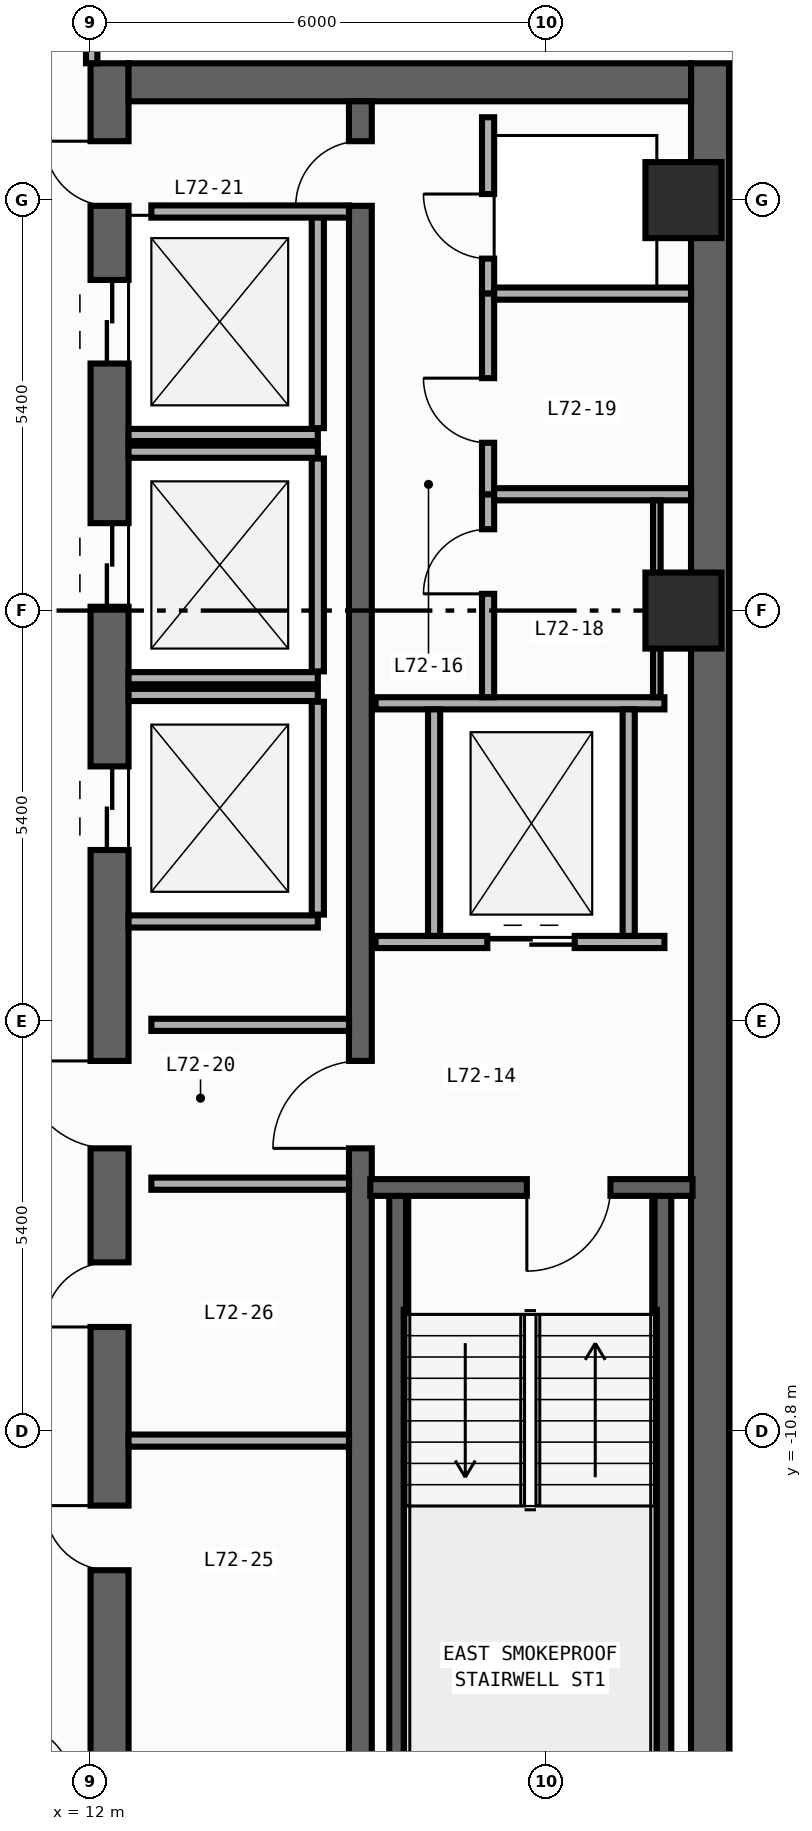
"""IFC4 building model, lengths in metres.
Left out: names, types, materials, properties, quantities, classifications, styles, units other than length and angle.
Written with IfcOpenShell. Run it as: python <this file> out.ifc"""

import sys

from ifc_helpers import new_model, si_unit, direction, frame, frame_2d, origin, origin_2d, place, context, subcontext, project, spatial, rectangle, circle, extrude, element, fill, save


model = new_model("IFC4")
c1 = context("Model", 3, precision=1e-05, world=origin(), true_north=direction((0.0, 1.0)))
c2 = subcontext(c1, "Body", "Model", "MODEL_VIEW")
j1 = project(units=[si_unit("LENGTHUNIT", "METRE"), si_unit("PLANEANGLEUNIT", "RADIAN")], contexts=[c1])
p1 = place(None, origin())
s1 = spatial("IfcSite", under=j1, at=p1, CompositionType="ELEMENT")
p2 = place(p1, origin())
s2 = spatial("IfcBuilding", under=s1, at=p2, CompositionType="ELEMENT")
p3 = place(p2, frame((0.0, 0.0, 300.4)))
s3 = spatial("IfcBuildingStorey", under=s2, at=p3, CompositionType="ELEMENT", Elevation=300.4)
p4 = place(p3, frame((12.25, -19.8, 0.0), z_axis=(0.0, 0.0, 1.0), x_axis=(0.0, 1.0, 0.0)))
e1 = element("IfcWall", 1, at=p4, inside=s3, PredefinedType="SHEAR", context=c2, shape_type="SweptSolid", body=[
    extrude(rectangle(XDim=27.0, YDim=0.5, at=frame_2d((13.5, 0.0))), origin(), (0.0, 0.0, 1.0), 3.54),
])
p5 = place(p4, frame((23.05, 0.0, 0.0)))
e2 = element("IfcOpeningElement", 2, at=p5, cuts=e1, PredefinedType="OPENING", context=c2, shape_type="SweptSolid", body=[
    extrude(rectangle(XDim=1.1, YDim=2.2, at=frame_2d((0.55, 1.1))), frame((0.0, 0.26, 0.0), z_axis=(0.0, -1.0, 0.0), x_axis=(1.0, 0.0, 0.0)), (0.0, 0.0, 1.0), 0.52),
])
p6 = place(p4, frame((19.85, 0.0, 0.0)))
e3 = element("IfcOpeningElement", 3, at=p6, cuts=e1, PredefinedType="OPENING", context=c2, shape_type="SweptSolid", body=[
    extrude(rectangle(XDim=1.1, YDim=2.2, at=frame_2d((0.55, 1.1))), frame((0.0, 0.26, 0.0), z_axis=(0.0, -1.0, 0.0), x_axis=(1.0, 0.0, 0.0)), (0.0, 0.0, 1.0), 0.52),
])
p7 = place(p4, frame((16.65, 0.0, 0.0)))
e4 = element("IfcOpeningElement", 4, at=p7, cuts=e1, PredefinedType="OPENING", context=c2, shape_type="SweptSolid", body=[
    extrude(rectangle(XDim=1.1, YDim=2.2, at=frame_2d((0.55, 1.1))), frame((0.0, 0.26, 0.0), z_axis=(0.0, -1.0, 0.0), x_axis=(1.0, 0.0, 0.0)), (0.0, 0.0, 1.0), 0.52),
])
p8 = place(p4, frame((7.175, 0.0, 0.0)))
e5 = element("IfcOpeningElement", 5, at=p8, cuts=e1, PredefinedType="OPENING", context=c2, shape_type="SweptSolid", body=[
    extrude(rectangle(XDim=0.85, YDim=2.1, at=frame_2d((0.425, 1.05))), frame((0.0, 0.26, 0.0), z_axis=(0.0, -1.0, 0.0), x_axis=(1.0, 0.0, 0.0)), (0.0, 0.0, 1.0), 0.52),
])
p9 = place(p4, frame((10.375, 0.0, 0.0)))
e6 = element("IfcOpeningElement", 6, at=p9, cuts=e1, PredefinedType="OPENING", context=c2, shape_type="SweptSolid", body=[
    extrude(rectangle(XDim=0.85, YDim=2.1, at=frame_2d((0.425, 1.05))), frame((0.0, 0.26, 0.0), z_axis=(0.0, -1.0, 0.0), x_axis=(1.0, 0.0, 0.0)), (0.0, 0.0, 1.0), 0.52),
])
p10 = place(p4, frame((12.725, 0.0, 0.0)))
e7 = element("IfcOpeningElement", 7, at=p10, cuts=e1, PredefinedType="OPENING", context=c2, shape_type="SweptSolid", body=[
    extrude(rectangle(XDim=1.15, YDim=2.2, at=frame_2d((0.575, 1.1))), frame((0.0, 0.26, 0.0), z_axis=(0.0, -1.0, 0.0), x_axis=(1.0, 0.0, 0.0)), (0.0, 0.0, 1.0), 0.52),
])
p11 = place(p4, frame((25.125, 0.0, 0.0)))
e8 = element("IfcOpeningElement", 8, at=p11, cuts=e1, PredefinedType="OPENING", context=c2, shape_type="SweptSolid", body=[
    extrude(rectangle(XDim=0.85, YDim=2.1, at=frame_2d((0.425, 1.05))), frame((0.0, 0.26, 0.0), z_axis=(0.0, -1.0, 0.0), x_axis=(1.0, 0.0, 0.0)), (0.0, 0.0, 1.0), 0.52),
])
p12 = place(p3, frame((20.15, -19.8, 0.0), z_axis=(0.0, 0.0, 1.0), x_axis=(0.0, 1.0, 0.0)))
e9 = element("IfcWall", 9, at=p12, inside=s3, PredefinedType="SHEAR", context=c2, shape_type="SweptSolid", body=[
    extrude(rectangle(XDim=27.0, YDim=0.5, at=frame_2d((13.5, 0.0))), origin(), (0.0, 0.0, 1.0), 3.54),
])
p13 = place(p3, frame((12.5, 6.95, 0.0), z_axis=(0.0, 0.0, 1.0), x_axis=(1.0, 0.0, 0.0)))
e10 = element("IfcWall", 10, at=p13, inside=s3, PredefinedType="SHEAR", context=c2, shape_type="SweptSolid", body=[
    extrude(rectangle(XDim=7.4, YDim=0.5, at=frame_2d((3.7, 0.0))), origin(), (0.0, 0.0, 1.0), 3.54),
])
p14 = place(p3, frame((15.55, -19.3, 0.0), z_axis=(0.0, 0.0, 1.0), x_axis=(0.0, 1.0, 0.0)))
e11 = element("IfcWall", 11, at=p14, inside=s3, PredefinedType="SHEAR", context=c2, shape_type="SweptSolid", body=[
    extrude(rectangle(XDim=26.0, YDim=0.3, at=frame_2d((13.0, 0.0))), origin(), (0.0, 0.0, 1.0), 3.54),
])
p15 = place(p14, frame((12.225, 0.0, 0.0)))
e12 = element("IfcOpeningElement", 12, at=p15, cuts=e11, PredefinedType="OPENING", context=c2, shape_type="SweptSolid", body=[
    extrude(rectangle(XDim=1.15, YDim=2.2, at=frame_2d((0.575, 1.1))), frame((0.0, 0.16, 0.0), z_axis=(0.0, -1.0, 0.0), x_axis=(1.0, 0.0, 0.0)), (0.0, 0.0, 1.0), 0.32),
])
p16 = place(p14, frame((24.625, 0.0, 0.0)))
e13 = element("IfcOpeningElement", 13, at=p16, cuts=e11, PredefinedType="OPENING", context=c2, shape_type="SweptSolid", body=[
    extrude(rectangle(XDim=0.85, YDim=2.1, at=frame_2d((0.425, 1.05))), frame((0.0, 0.16, 0.0), z_axis=(0.0, -1.0, 0.0), x_axis=(1.0, 0.0, 0.0)), (0.0, 0.0, 1.0), 0.32),
])
for number, where, z_axis, x_axis in (
    (14, (16.04, -19.01, 0.0), (0.0, 0.0, 1.0), (0.0, 1.0, 0.0)),
    (15, (19.53, -19.01, 0.0), (0.0, 0.0, 1.0), (0.0, 1.0, 0.0)),
):
    element("IfcWall", number, at=place(p3, frame(where, z_axis=z_axis, x_axis=x_axis)), inside=s3, PredefinedType="SHEAR", context=c2, shape_type="SweptSolid", body=[
        extrude(rectangle(XDim=11.42, YDim=0.22, at=frame_2d((5.71, 0.0))), origin(), (0.0, 0.0, 1.0), 3.54),
    ])
p17 = place(p3, frame((19.92, -7.59, 0.0), z_axis=(0.0, 0.0, 1.0), x_axis=(-1.0, 0.0, 0.0)))
e16 = element("IfcWall", 16, at=p17, inside=s3, PredefinedType="SHEAR", context=c2, shape_type="SweptSolid", body=[
    extrude(rectangle(XDim=4.24, YDim=0.22, at=frame_2d((2.12, 0.0))), origin(), (0.0, 0.0, 1.0), 3.54),
])
p18 = place(p17, frame((1.08, 0.0, 0.0)))
e17 = element("IfcOpeningElement", 17, at=p18, cuts=e16, PredefinedType="OPENING", context=c2, shape_type="SweptSolid", body=[
    extrude(rectangle(XDim=1.1, YDim=2.2, at=frame_2d((0.55, 1.1))), frame((0.0, 0.12, 0.0), z_axis=(0.0, -1.0, 0.0), x_axis=(1.0, 0.0, 0.0)), (0.0, 0.0, 1.0), 0.24),
])
for number, where, z_axis, x_axis in (
    (18, (19.8, 0.0, 0.0), (0.0, 0.0, 1.0), (1.0, 0.0, 0.0)),
    (19, (19.8, 5.4, 0.0), (0.0, 0.0, 1.0), (1.0, 0.0, 0.0)),
):
    element("IfcColumn", number, at=place(p3, frame(where, z_axis=z_axis, x_axis=x_axis)), inside=s3, PredefinedType="COLUMN", context=c2, shape_type="SweptSolid", body=[
        extrude(circle(Radius=0.5, at=origin_2d()), origin(), (0.0, 0.0, 1.0), 3.8),
    ])
p19 = place(p3, frame((12.5, 2.31, 0.0), z_axis=(0.0, 0.0, 1.0), x_axis=(1.0, 0.0, 0.0)))
e20 = element("IfcWall", 20, at=p19, inside=s3, PredefinedType="STANDARD", context=c2, shape_type="SweptSolid", body=[
    extrude(rectangle(XDim=2.49, YDim=0.16, at=frame_2d((1.245, 0.0))), origin(), (0.0, 0.0, 1.0), 3.54),
])
p20 = place(p3, frame((14.99, 2.4, 0.0), z_axis=(0.0, 0.0, 1.0), x_axis=(0.0, 1.0, 0.0)))
e21 = element("IfcWall", 21, at=p20, inside=s3, PredefinedType="STANDARD", context=c2, shape_type="SweptSolid", body=[
    extrude(rectangle(XDim=2.8, YDim=0.16, at=frame_2d((1.4, 0.0))), origin(), (0.0, 0.0, 1.0), 3.54),
])
for number, where, z_axis, x_axis in (
    (22, (12.5, -0.89, 0.0), (0.0, 0.0, 1.0), (1.0, 0.0, 0.0)),
    (23, (12.5, 2.09, 0.0), (0.0, 0.0, 1.0), (1.0, 0.0, 0.0)),
):
    element("IfcWall", number, at=place(p3, frame(where, z_axis=z_axis, x_axis=x_axis)), inside=s3, PredefinedType="STANDARD", context=c2, shape_type="SweptSolid", body=[
        extrude(rectangle(XDim=2.49, YDim=0.16, at=frame_2d((1.245, 0.0))), origin(), (0.0, 0.0, 1.0), 3.54),
    ])
p21 = place(p3, frame((14.99, -0.8, 0.0), z_axis=(0.0, 0.0, 1.0), x_axis=(0.0, 1.0, 0.0)))
e24 = element("IfcWall", 24, at=p21, inside=s3, PredefinedType="STANDARD", context=c2, shape_type="SweptSolid", body=[
    extrude(rectangle(XDim=2.8, YDim=0.16, at=frame_2d((1.4, 0.0))), origin(), (0.0, 0.0, 1.0), 3.54),
])
for number, where, z_axis, x_axis in (
    (25, (12.5, -4.09, 0.0), (0.0, 0.0, 1.0), (1.0, 0.0, 0.0)),
    (26, (12.5, -1.11, 0.0), (0.0, 0.0, 1.0), (1.0, 0.0, 0.0)),
):
    element("IfcWall", number, at=place(p3, frame(where, z_axis=z_axis, x_axis=x_axis)), inside=s3, PredefinedType="STANDARD", context=c2, shape_type="SweptSolid", body=[
        extrude(rectangle(XDim=2.49, YDim=0.16, at=frame_2d((1.245, 0.0))), origin(), (0.0, 0.0, 1.0), 3.54),
    ])
p22 = place(p3, frame((14.99, -4.0, 0.0), z_axis=(0.0, 0.0, 1.0), x_axis=(0.0, 1.0, 0.0)))
e27 = element("IfcWall", 27, at=p22, inside=s3, PredefinedType="STANDARD", context=c2, shape_type="SweptSolid", body=[
    extrude(rectangle(XDim=2.8, YDim=0.16, at=frame_2d((1.4, 0.0))), origin(), (0.0, 0.0, 1.0), 3.54),
])
p23 = place(p3, frame((15.75, -4.36, 0.0), z_axis=(0.0, 0.0, 1.0), x_axis=(1.0, 0.0, 0.0)))
e28 = element("IfcWall", 28, at=p23, inside=s3, PredefinedType="STANDARD", context=c2, shape_type="SweptSolid", body=[
    extrude(rectangle(XDim=3.8, YDim=0.16, at=frame_2d((1.9, 0.0))), origin(), (0.0, 0.0, 1.0), 3.54),
])
p24 = place(p23, frame((1.47, 0.0, 0.0)))
e29 = element("IfcOpeningElement", 29, at=p24, cuts=e28, PredefinedType="OPENING", context=c2, shape_type="SweptSolid", body=[
    extrude(rectangle(XDim=1.15, YDim=2.2, at=frame_2d((0.575, 1.1))), frame((0.0, 0.09, 0.0), z_axis=(0.0, -1.0, 0.0), x_axis=(1.0, 0.0, 0.0)), (0.0, 0.0, 1.0), 0.18),
])
p25 = place(p3, frame((15.75, -1.22, 0.0), z_axis=(0.0, 0.0, 1.0), x_axis=(1.0, 0.0, 0.0)))
e30 = element("IfcWall", 30, at=p25, inside=s3, PredefinedType="STANDARD", context=c2, shape_type="SweptSolid", body=[
    extrude(rectangle(XDim=3.8, YDim=0.16, at=frame_2d((1.9, 0.0))), origin(), (0.0, 0.0, 1.0), 3.54),
])
for number, where, z_axis, x_axis in (
    (31, (16.52, -4.28, 0.0), (0.0, 0.0, 1.0), (0.0, 1.0, 0.0)),
    (32, (19.08, -4.28, 0.0), (0.0, 0.0, 1.0), (0.0, 1.0, 0.0)),
):
    element("IfcWall", number, at=place(p3, frame(where, z_axis=z_axis, x_axis=x_axis)), inside=s3, PredefinedType="STANDARD", context=c2, shape_type="SweptSolid", body=[
        extrude(rectangle(XDim=2.98, YDim=0.16, at=frame_2d((1.49, 0.0))), origin(), (0.0, 0.0, 1.0), 3.54),
    ])
for number, where, z_axis, x_axis in (
    (33, (12.8, -5.45, 0.0), (0.0, 0.0, 1.0), (1.0, 0.0, 0.0)),
    (34, (12.8, -7.54, 0.0), (0.0, 0.0, 1.0), (1.0, 0.0, 0.0)),
    (35, (12.8, 5.25, 0.0), (0.0, 0.0, 1.0), (1.0, 0.0, 0.0)),
):
    element("IfcWall", number, at=place(p3, frame(where, z_axis=z_axis, x_axis=x_axis)), inside=s3, PredefinedType="STANDARD", context=c2, shape_type="SweptSolid", body=[
        extrude(rectangle(XDim=2.6, YDim=0.16, at=frame_2d((1.3, 0.0))), origin(), (0.0, 0.0, 1.0), 3.54),
    ])
p26 = place(p3, frame((17.23, 4.17, 0.0), z_axis=(0.0, 0.0, 1.0), x_axis=(0.0, 1.0, 0.0)))
e36 = element("IfcWall", 36, at=p26, inside=s3, PredefinedType="PARTITIONING", context=c2, shape_type="SweptSolid", body=[
    extrude(rectangle(XDim=2.32, YDim=0.16, at=frame_2d((1.16, 0.0))), origin(), (0.0, 0.0, 1.0), 3.54),
])
p27 = place(p26, frame((0.46, 0.0, 0.0)))
e37 = element("IfcOpeningElement", 37, at=p27, cuts=e36, PredefinedType="OPENING", context=c2, shape_type="SweptSolid", body=[
    extrude(rectangle(XDim=0.85, YDim=2.1, at=frame_2d((0.425, 1.05))), frame((0.0, 0.09, 0.0), z_axis=(0.0, -1.0, 0.0), x_axis=(1.0, 0.0, 0.0)), (0.0, 0.0, 1.0), 0.18),
])
p28 = place(p3, frame((17.23, -1.14, 0.0), z_axis=(0.0, 0.0, 1.0), x_axis=(0.0, 1.0, 0.0)))
e38 = element("IfcWall", 38, at=p28, inside=s3, PredefinedType="PARTITIONING", context=c2, shape_type="SweptSolid", body=[
    extrude(rectangle(XDim=2.67, YDim=0.16, at=frame_2d((1.335, 0.0))), origin(), (0.0, 0.0, 1.0), 3.54),
])
p29 = place(p28, frame((1.36, 0.0, 0.0)))
e39 = element("IfcOpeningElement", 39, at=p29, cuts=e38, PredefinedType="OPENING", context=c2, shape_type="SweptSolid", body=[
    extrude(rectangle(XDim=0.85, YDim=2.1, at=frame_2d((0.425, 1.05))), frame((0.0, 0.09, 0.0), z_axis=(0.0, -1.0, 0.0), x_axis=(1.0, 0.0, 0.0)), (0.0, 0.0, 1.0), 0.18),
])
p30 = place(p3, frame((17.23, 1.53, 0.0), z_axis=(0.0, 0.0, 1.0), x_axis=(0.0, 1.0, 0.0)))
e40 = element("IfcWall", 40, at=p30, inside=s3, PredefinedType="PARTITIONING", context=c2, shape_type="SweptSolid", body=[
    extrude(rectangle(XDim=2.64, YDim=0.16, at=frame_2d((1.32, 0.0))), origin(), (0.0, 0.0, 1.0), 3.54),
])
p31 = place(p30, frame((0.677, 0.0, 0.0)))
e41 = element("IfcOpeningElement", 41, at=p31, cuts=e40, PredefinedType="OPENING", context=c2, shape_type="SweptSolid", body=[
    extrude(rectangle(XDim=0.85, YDim=2.1, at=frame_2d((0.425, 1.05))), frame((0.0, 0.09, 0.0), z_axis=(0.0, -1.0, 0.0), x_axis=(1.0, 0.0, 0.0)), (0.0, 0.0, 1.0), 0.18),
])
for number, where, z_axis, x_axis in (
    (42, (17.31, 4.17, 0.0), (0.0, 0.0, 1.0), (1.0, 0.0, 0.0)),
    (43, (17.31, 1.53, 0.0), (0.0, 0.0, 1.0), (1.0, 0.0, 0.0)),
):
    element("IfcWall", number, at=place(p3, frame(where, z_axis=z_axis, x_axis=x_axis)), inside=s3, PredefinedType="PARTITIONING", context=c2, shape_type="SweptSolid", body=[
        extrude(rectangle(XDim=2.59, YDim=0.16, at=frame_2d((1.295, 0.0))), origin(), (0.0, 0.0, 1.0), 3.54),
    ])
p32 = place(p3, frame((12.5, -10.92, 0.0), z_axis=(0.0, 0.0, 1.0), x_axis=(1.0, 0.0, 0.0)))
e44 = element("IfcWall", 44, at=p32, inside=s3, PredefinedType="PARTITIONING", context=c2, shape_type="SweptSolid", body=[
    extrude(rectangle(XDim=2.9, YDim=0.16, at=frame_2d((1.45, 0.0))), origin(), (0.0, 0.0, 1.0), 2.64),
])
p33 = place(p3, frame((12.015, 7.2, 0.0), z_axis=(0.0, 0.0, 1.0), x_axis=(0.0, 1.0, 0.0)))
e45 = element("IfcWall", 45, at=p33, inside=s3, PredefinedType="PARTITIONING", context=c2, shape_type="SweptSolid", body=[
    extrude(rectangle(XDim=6.68, YDim=0.15, at=frame_2d((3.34, 0.0))), origin(), (0.0, 0.0, 1.0), 3.54),
])
p34 = place(p33, frame((0.67, 0.0, 0.0)))
e46 = element("IfcOpeningElement", 46, at=p34, cuts=e45, PredefinedType="OPENING", context=c2, shape_type="SweptSolid", body=[
    extrude(rectangle(XDim=0.9, YDim=2.15, at=frame_2d((0.45, 1.075))), frame((0.0, 0.085, 0.0), z_axis=(0.0, -1.0, 0.0), x_axis=(1.0, 0.0, 0.0)), (0.0, 0.0, 1.0), 0.17),
])
p35 = place(p3, frame((19.45, 1.45, 0.0), z_axis=(0.0, 0.0, 1.0), x_axis=(0.0, -1.0, 0.0)))
e47 = element("IfcWall", 47, at=p35, inside=s3, PredefinedType="PARTITIONING", context=c2, shape_type="SweptSolid", body=[
    extrude(rectangle(XDim=2.59, YDim=0.1, at=frame_2d((1.295, 0.0))), origin(), (0.0, 0.0, 1.0), 3.54),
])
p36 = place(p18, origin())
e48 = element("IfcDoor", 48, at=p36, inside=s3, OperationType="SINGLE_SWING_RIGHT", PredefinedType="DOOR", context=c2, shape_type="SweptSolid", body=[
    extrude(rectangle(XDim=1.1, YDim=2.2, at=frame_2d((0.55, 1.1))), frame((0.0, 0.025, 0.0), z_axis=(0.0, -1.0, 0.0), x_axis=(1.0, 0.0, 0.0)), (0.0, 0.0, 1.0), 0.05),
])
fill(e17, e48)
p37 = place(p5, origin())
e49 = element("IfcDoor", 49, at=p37, inside=s3, OperationType="DOUBLE_DOOR_SLIDING", PredefinedType="DOOR", context=c2, shape_type="SweptSolid", body=[
    extrude(rectangle(XDim=1.1, YDim=2.2, at=frame_2d((0.55, 1.1))), frame((0.0, 0.025, 0.0), z_axis=(0.0, -1.0, 0.0), x_axis=(1.0, 0.0, 0.0)), (0.0, 0.0, 1.0), 0.05),
])
fill(e2, e49)
p38 = place(p6, origin())
e50 = element("IfcDoor", 50, at=p38, inside=s3, OperationType="DOUBLE_DOOR_SLIDING", PredefinedType="DOOR", context=c2, shape_type="SweptSolid", body=[
    extrude(rectangle(XDim=1.1, YDim=2.2, at=frame_2d((0.55, 1.1))), frame((0.0, 0.025, 0.0), z_axis=(0.0, -1.0, 0.0), x_axis=(1.0, 0.0, 0.0)), (0.0, 0.0, 1.0), 0.05),
])
fill(e3, e50)
p39 = place(p7, origin())
e51 = element("IfcDoor", 51, at=p39, inside=s3, OperationType="DOUBLE_DOOR_SLIDING", PredefinedType="DOOR", context=c2, shape_type="SweptSolid", body=[
    extrude(rectangle(XDim=1.1, YDim=2.2, at=frame_2d((0.55, 1.1))), frame((0.0, 0.025, 0.0), z_axis=(0.0, -1.0, 0.0), x_axis=(1.0, 0.0, 0.0)), (0.0, 0.0, 1.0), 0.05),
])
fill(e4, e51)
p40 = place(p8, origin())
e52 = element("IfcDoor", 52, at=p40, inside=s3, OperationType="SINGLE_SWING_RIGHT", PredefinedType="DOOR", context=c2, shape_type="SweptSolid", body=[
    extrude(rectangle(XDim=0.85, YDim=2.1, at=frame_2d((0.425, 1.05))), frame((0.0, 0.025, 0.0), z_axis=(0.0, -1.0, 0.0), x_axis=(1.0, 0.0, 0.0)), (0.0, 0.0, 1.0), 0.05),
])
fill(e5, e52)
p41 = place(p9, origin())
e53 = element("IfcDoor", 53, at=p41, inside=s3, OperationType="SINGLE_SWING_LEFT", PredefinedType="DOOR", context=c2, shape_type="SweptSolid", body=[
    extrude(rectangle(XDim=0.85, YDim=2.1, at=frame_2d((0.425, 1.05))), frame((0.0, 0.025, 0.0), z_axis=(0.0, -1.0, 0.0), x_axis=(1.0, 0.0, 0.0)), (0.0, 0.0, 1.0), 0.05),
])
fill(e6, e53)
p42 = place(p10, origin())
e54 = element("IfcDoor", 54, at=p42, inside=s3, OperationType="SINGLE_SWING_RIGHT", PredefinedType="DOOR", context=c2, shape_type="SweptSolid", body=[
    extrude(rectangle(XDim=1.15, YDim=2.2, at=frame_2d((0.575, 1.1))), frame((0.0, 0.025, 0.0), z_axis=(0.0, -1.0, 0.0), x_axis=(1.0, 0.0, 0.0)), (0.0, 0.0, 1.0), 0.05),
])
fill(e7, e54)
p43 = place(p15, origin())
e55 = element("IfcDoor", 55, at=p43, inside=s3, OperationType="SINGLE_SWING_LEFT", PredefinedType="DOOR", context=c2, shape_type="SweptSolid", body=[
    extrude(rectangle(XDim=1.15, YDim=2.2, at=frame_2d((0.575, 1.1))), frame((0.0, 0.025, 0.0), z_axis=(0.0, -1.0, 0.0), x_axis=(1.0, 0.0, 0.0)), (0.0, 0.0, 1.0), 0.05),
])
fill(e12, e55)
p44 = place(p11, origin())
e56 = element("IfcDoor", 56, at=p44, inside=s3, OperationType="SINGLE_SWING_RIGHT", PredefinedType="DOOR", context=c2, shape_type="SweptSolid", body=[
    extrude(rectangle(XDim=0.85, YDim=2.1, at=frame_2d((0.425, 1.05))), frame((0.0, 0.025, 0.0), z_axis=(0.0, -1.0, 0.0), x_axis=(1.0, 0.0, 0.0)), (0.0, 0.0, 1.0), 0.05),
])
fill(e8, e56)
p45 = place(p16, origin())
e57 = element("IfcDoor", 57, at=p45, inside=s3, OperationType="SINGLE_SWING_LEFT", PredefinedType="DOOR", context=c2, shape_type="SweptSolid", body=[
    extrude(rectangle(XDim=0.85, YDim=2.1, at=frame_2d((0.425, 1.05))), frame((0.0, 0.025, 0.0), z_axis=(0.0, -1.0, 0.0), x_axis=(1.0, 0.0, 0.0)), (0.0, 0.0, 1.0), 0.05),
])
fill(e13, e57)
p46 = place(p24, origin())
e58 = element("IfcDoor", 58, at=p46, inside=s3, OperationType="DOUBLE_DOOR_SLIDING", PredefinedType="DOOR", context=c2, shape_type="SweptSolid", body=[
    extrude(rectangle(XDim=1.15, YDim=2.2, at=frame_2d((0.575, 1.1))), frame((0.0, 0.025, 0.0), z_axis=(0.0, -1.0, 0.0), x_axis=(1.0, 0.0, 0.0)), (0.0, 0.0, 1.0), 0.05),
])
fill(e29, e58)
p47 = place(p27, origin())
e59 = element("IfcDoor", 59, at=p47, inside=s3, OperationType="SINGLE_SWING_RIGHT", PredefinedType="DOOR", context=c2, shape_type="SweptSolid", body=[
    extrude(rectangle(XDim=0.85, YDim=2.1, at=frame_2d((0.425, 1.05))), frame((0.0, 0.025, 0.0), z_axis=(0.0, -1.0, 0.0), x_axis=(1.0, 0.0, 0.0)), (0.0, 0.0, 1.0), 0.05),
])
fill(e37, e59)
p48 = place(p29, origin())
e60 = element("IfcDoor", 60, at=p48, inside=s3, OperationType="SINGLE_SWING_LEFT", PredefinedType="DOOR", context=c2, shape_type="SweptSolid", body=[
    extrude(rectangle(XDim=0.85, YDim=2.1, at=frame_2d((0.425, 1.05))), frame((0.0, 0.025, 0.0), z_axis=(0.0, -1.0, 0.0), x_axis=(1.0, 0.0, 0.0)), (0.0, 0.0, 1.0), 0.05),
])
fill(e39, e60)
p49 = place(p31, origin())
e61 = element("IfcDoor", 61, at=p49, inside=s3, OperationType="SINGLE_SWING_RIGHT", PredefinedType="DOOR", context=c2, shape_type="SweptSolid", body=[
    extrude(rectangle(XDim=0.85, YDim=2.1, at=frame_2d((0.425, 1.05))), frame((0.0, 0.025, 0.0), z_axis=(0.0, -1.0, 0.0), x_axis=(1.0, 0.0, 0.0)), (0.0, 0.0, 1.0), 0.05),
])
fill(e41, e61)
save(model, sys.argv[1])
